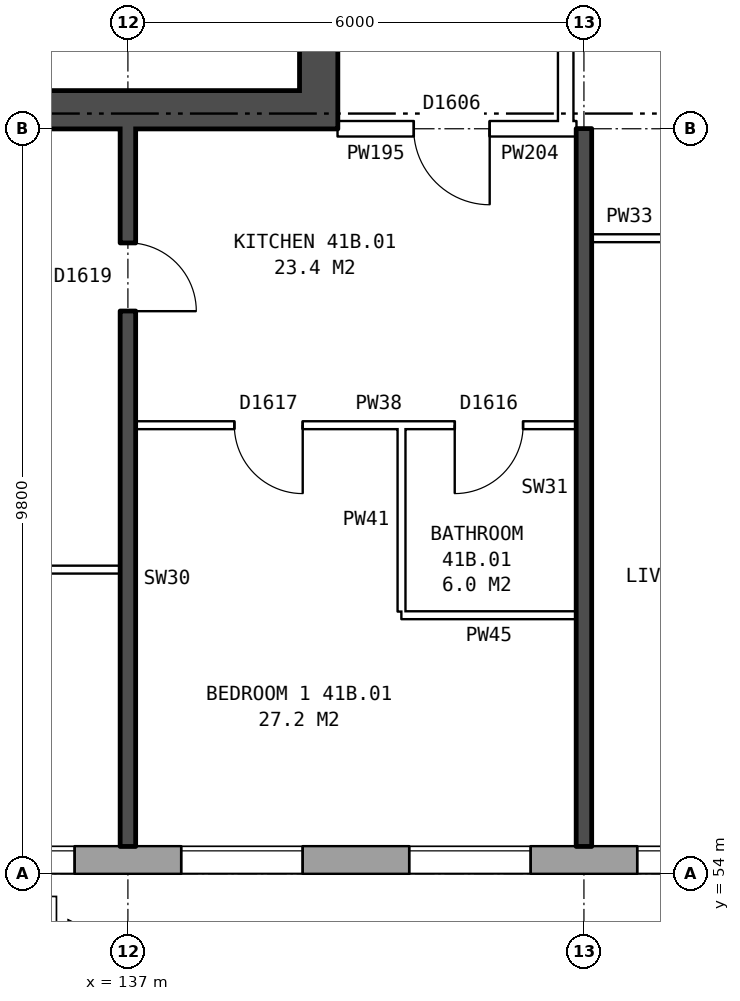
"""IFC4 building model, lengths in metres.
Left out: names, types, materials, properties, quantities, classifications, styles, units other than length and angle.
Written with IfcOpenShell. Run it as: python <this file> out.ifc"""

import sys

from ifc_helpers import new_model, si_unit, direction, frame, frame_2d, origin, place, context, subcontext, project, spatial, rectangle, extrude, element, fill, save


model = new_model("IFC4")
c1 = context("Model", 3, precision=1e-05, world=origin(), true_north=direction((0.0, 1.0)))
c2 = subcontext(c1, "Body", "Model", "MODEL_VIEW")
j1 = project(units=[si_unit("LENGTHUNIT", "METRE"), si_unit("PLANEANGLEUNIT", "RADIAN")], contexts=[c1])
p1 = place(None, origin())
s1 = spatial("IfcSite", under=j1, at=p1, CompositionType="ELEMENT")
p2 = place(p1, origin())
s2 = spatial("IfcBuilding", under=s1, at=p2, CompositionType="ELEMENT")
p3 = place(p2, frame((0.0, 0.0, 148.5)))
s3 = spatial("IfcBuildingStorey", under=s2, at=p3, CompositionType="ELEMENT", Elevation=148.5)
p4 = place(p3, frame((134.075, 54.18, 0.0), z_axis=(0.0, 0.0, 1.0), x_axis=(1.0, 0.0, 0.0)))
e1 = element("IfcWall", 1, at=p4, inside=s3, PredefinedType="STANDARD", context=c2, shape_type="SweptSolid", body=[
    extrude(rectangle(XDim=34.351, YDim=0.36, at=frame_2d((17.175, 0.0))), origin(), (0.0, 0.0, 1.0), 2.85),
])
p5 = place(p4, frame((0.625, 0.0, 0.8)))
e2 = element("IfcOpeningElement", 2, at=p5, cuts=e1, PredefinedType="OPENING", context=c2, shape_type="SweptSolid", body=[
    extrude(rectangle(XDim=1.6, YDim=1.8, at=frame_2d((0.8, 0.9))), frame((0.0, 0.19, 0.0), z_axis=(0.0, -1.0, 0.0), x_axis=(1.0, 0.0, 0.0)), (0.0, 0.0, 1.0), 0.38),
])
p6 = place(p4, frame((3.625, 0.0, 0.8)))
e3 = element("IfcOpeningElement", 3, at=p6, cuts=e1, PredefinedType="OPENING", context=c2, shape_type="SweptSolid", body=[
    extrude(rectangle(XDim=1.6, YDim=1.8, at=frame_2d((0.8, 0.9))), frame((0.0, 0.19, 0.0), z_axis=(0.0, -1.0, 0.0), x_axis=(1.0, 0.0, 0.0)), (0.0, 0.0, 1.0), 0.38),
])
p7 = place(p4, frame((6.625, 0.0, 0.8)))
e4 = element("IfcOpeningElement", 4, at=p7, cuts=e1, PredefinedType="OPENING", context=c2, shape_type="SweptSolid", body=[
    extrude(rectangle(XDim=1.6, YDim=1.8, at=frame_2d((0.8, 0.9))), frame((0.0, 0.19, 0.0), z_axis=(0.0, -1.0, 0.0), x_axis=(1.0, 0.0, 0.0)), (0.0, 0.0, 1.0), 0.38),
])
p8 = place(p4, frame((9.625, 0.0, 0.8)))
e5 = element("IfcOpeningElement", 5, at=p8, cuts=e1, PredefinedType="OPENING", context=c2, shape_type="SweptSolid", body=[
    extrude(rectangle(XDim=1.6, YDim=1.8, at=frame_2d((0.8, 0.9))), frame((0.0, 0.19, 0.0), z_axis=(0.0, -1.0, 0.0), x_axis=(1.0, 0.0, 0.0)), (0.0, 0.0, 1.0), 0.38),
])
p9 = place(p4, frame((12.625, 0.0, 0.8)))
e6 = element("IfcOpeningElement", 6, at=p9, cuts=e1, PredefinedType="OPENING", context=c2, shape_type="SweptSolid", body=[
    extrude(rectangle(XDim=1.6, YDim=1.8, at=frame_2d((0.8, 0.9))), frame((0.0, 0.19, 0.0), z_axis=(0.0, -1.0, 0.0), x_axis=(1.0, 0.0, 0.0)), (0.0, 0.0, 1.0), 0.38),
])
p10 = place(p4, frame((15.625, 0.0, 0.8)))
e7 = element("IfcOpeningElement", 7, at=p10, cuts=e1, PredefinedType="OPENING", context=c2, shape_type="SweptSolid", body=[
    extrude(rectangle(XDim=1.6, YDim=1.8, at=frame_2d((0.8, 0.9))), frame((0.0, 0.19, 0.0), z_axis=(0.0, -1.0, 0.0), x_axis=(1.0, 0.0, 0.0)), (0.0, 0.0, 1.0), 0.38),
])
p11 = place(p4, frame((18.625, 0.0, 0.8)))
e8 = element("IfcOpeningElement", 8, at=p11, cuts=e1, PredefinedType="OPENING", context=c2, shape_type="SweptSolid", body=[
    extrude(rectangle(XDim=1.6, YDim=1.8, at=frame_2d((0.8, 0.9))), frame((0.0, 0.19, 0.0), z_axis=(0.0, -1.0, 0.0), x_axis=(1.0, 0.0, 0.0)), (0.0, 0.0, 1.0), 0.38),
])
p12 = place(p4, frame((21.625, 0.0, 0.8)))
e9 = element("IfcOpeningElement", 9, at=p12, cuts=e1, PredefinedType="OPENING", context=c2, shape_type="SweptSolid", body=[
    extrude(rectangle(XDim=1.6, YDim=1.8, at=frame_2d((0.8, 0.9))), frame((0.0, 0.19, 0.0), z_axis=(0.0, -1.0, 0.0), x_axis=(1.0, 0.0, 0.0)), (0.0, 0.0, 1.0), 0.38),
])
p13 = place(p4, frame((24.625, 0.0, 0.8)))
e10 = element("IfcOpeningElement", 10, at=p13, cuts=e1, PredefinedType="OPENING", context=c2, shape_type="SweptSolid", body=[
    extrude(rectangle(XDim=1.6, YDim=1.8, at=frame_2d((0.8, 0.9))), frame((0.0, 0.19, 0.0), z_axis=(0.0, -1.0, 0.0), x_axis=(1.0, 0.0, 0.0)), (0.0, 0.0, 1.0), 0.38),
])
p14 = place(p4, frame((27.625, 0.0, 0.8)))
e11 = element("IfcOpeningElement", 11, at=p14, cuts=e1, PredefinedType="OPENING", context=c2, shape_type="SweptSolid", body=[
    extrude(rectangle(XDim=1.6, YDim=1.8, at=frame_2d((0.8, 0.9))), frame((0.0, 0.19, 0.0), z_axis=(0.0, -1.0, 0.0), x_axis=(1.0, 0.0, 0.0)), (0.0, 0.0, 1.0), 0.38),
])
p15 = place(p4, frame((30.625, 0.0, 0.8)))
e12 = element("IfcOpeningElement", 12, at=p15, cuts=e1, PredefinedType="OPENING", context=c2, shape_type="SweptSolid", body=[
    extrude(rectangle(XDim=1.6, YDim=1.8, at=frame_2d((0.8, 0.9))), frame((0.0, 0.19, 0.0), z_axis=(0.0, -1.0, 0.0), x_axis=(1.0, 0.0, 0.0)), (0.0, 0.0, 1.0), 0.38),
])
p16 = place(p3, frame((139.51, 63.8, 0.0), z_axis=(0.0, 0.0, 1.0), x_axis=(0.0, 1.0, 0.0)))
e13 = element("IfcWall", 13, at=p16, inside=s3, PredefinedType="SHEAR", context=c2, shape_type="SweptSolid", body=[
    extrude(rectangle(XDim=12.4, YDim=0.5, at=frame_2d((6.2, 0.0))), origin(), (0.0, 0.0, 1.0), 2.85),
])
p17 = place(p16, frame((1.325, 0.0, 0.0)))
e14 = element("IfcOpeningElement", 14, at=p17, cuts=e13, PredefinedType="OPENING", context=c2, shape_type="SweptSolid", body=[
    extrude(rectangle(XDim=1.1, YDim=2.1, at=frame_2d((0.55, 1.05))), frame((0.0, 0.26, 0.0), z_axis=(0.0, -1.0, 0.0), x_axis=(1.0, 0.0, 0.0)), (0.0, 0.0, 1.0), 0.52),
])
p18 = place(p16, frame((3.6, 0.0, 0.0)))
e15 = element("IfcOpeningElement", 15, at=p18, cuts=e13, PredefinedType="OPENING", context=c2, shape_type="SweptSolid", body=[
    extrude(rectangle(XDim=1.1, YDim=2.1, at=frame_2d((0.55, 1.05))), frame((0.0, 0.26, 0.0), z_axis=(0.0, -1.0, 0.0), x_axis=(1.0, 0.0, 0.0)), (0.0, 0.0, 1.0), 0.52),
])
p19 = place(p16, frame((5.8, 0.0, 0.0)))
e16 = element("IfcOpeningElement", 16, at=p19, cuts=e13, PredefinedType="OPENING", context=c2, shape_type="SweptSolid", body=[
    extrude(rectangle(XDim=1.1, YDim=2.1, at=frame_2d((0.55, 1.05))), frame((0.0, 0.26, 0.0), z_axis=(0.0, -1.0, 0.0), x_axis=(1.0, 0.0, 0.0)), (0.0, 0.0, 1.0), 0.52),
])
p20 = place(p16, frame((9.9, 0.0, 0.0)))
e17 = element("IfcOpeningElement", 17, at=p20, cuts=e13, PredefinedType="OPENING", context=c2, shape_type="SweptSolid", body=[
    extrude(rectangle(XDim=1.1, YDim=2.1, at=frame_2d((0.55, 1.05))), frame((0.0, 0.26, 0.0), z_axis=(0.0, -1.0, 0.0), x_axis=(1.0, 0.0, 0.0)), (0.0, 0.0, 1.0), 0.52),
])
p21 = place(p16, frame((8.125, 0.0, 0.0)))
e18 = element("IfcOpeningElement", 18, at=p21, cuts=e13, PredefinedType="OPENING", context=c2, shape_type="SweptSolid", body=[
    extrude(rectangle(XDim=0.85, YDim=2.1, at=frame_2d((0.425, 1.05))), frame((0.0, 0.26, 0.0), z_axis=(0.0, -1.0, 0.0), x_axis=(1.0, 0.0, 0.0)), (0.0, 0.0, 1.0), 0.52),
])
p22 = place(p3, frame((139.26, 64.05, 0.0), z_axis=(0.0, 0.0, 1.0), x_axis=(-1.0, 0.0, 0.0)))
e19 = element("IfcWall", 19, at=p22, inside=s3, PredefinedType="SHEAR", context=c2, shape_type="SweptSolid", body=[
    extrude(rectangle(XDim=7.4, YDim=0.5, at=frame_2d((3.7, 0.0))), origin(), (0.0, 0.0, 1.0), 2.85),
])
p23 = place(p3, frame((142.76, 63.9, 0.0), z_axis=(0.0, 0.0, 1.0), x_axis=(0.0, 1.0, 0.0)))
e20 = element("IfcWall", 20, at=p23, inside=s3, PredefinedType="PARTITIONING", context=c2, shape_type="SweptSolid", body=[
    extrude(rectangle(XDim=12.2, YDim=0.2, at=frame_2d((6.1, 0.0))), origin(), (0.0, 0.0, 1.0), 2.85),
])
p24 = place(p23, frame((5.1, 0.0, 0.0)))
e21 = element("IfcOpeningElement", 21, at=p24, cuts=e20, PredefinedType="OPENING", context=c2, shape_type="SweptSolid", body=[
    extrude(rectangle(XDim=2.0, YDim=2.1, at=frame_2d((1.0, 1.05))), frame((0.0, 0.11, 0.0), z_axis=(0.0, -1.0, 0.0), x_axis=(1.0, 0.0, 0.0)), (0.0, 0.0, 1.0), 0.22),
])
p25 = place(p3, frame((140.6, 57.4, 0.0), z_axis=(0.0, 0.0, 1.0), x_axis=(1.0, 0.0, 0.0)))
e22 = element("IfcWall", 22, at=p25, inside=s3, PredefinedType="PARTITIONING", context=c2, shape_type="SweptSolid", body=[
    extrude(rectangle(XDim=2.3, YDim=0.1, at=frame_2d((1.15, 0.0))), origin(), (0.0, 0.0, 1.0), 2.85),
])
p26 = place(p3, frame((131.36, 58.0, 0.0), z_axis=(0.0, 0.0, 1.0), x_axis=(1.0, 0.0, 0.0)))
e23 = element("IfcWall", 23, at=p26, inside=s3, PredefinedType="PARTITIONING", context=c2, shape_type="SweptSolid", body=[
    extrude(rectangle(XDim=5.54, YDim=0.1, at=frame_2d((2.77, 0.0))), origin(), (0.0, 0.0, 1.0), 2.85),
])
p27 = place(p26, frame((2.32, 0.0, 0.0)))
e24 = element("IfcOpeningElement", 24, at=p27, cuts=e23, PredefinedType="OPENING", context=c2, shape_type="SweptSolid", body=[
    extrude(rectangle(XDim=0.9, YDim=2.1, at=frame_2d((0.45, 1.05))), frame((0.0, 0.06, 0.0), z_axis=(0.0, -1.0, 0.0), x_axis=(1.0, 0.0, 0.0)), (0.0, 0.0, 1.0), 0.12),
])
p28 = place(p3, frame((137.1, 59.9, 0.0), z_axis=(0.0, 0.0, 1.0), x_axis=(1.0, 0.0, 0.0)))
e25 = element("IfcWall", 25, at=p28, inside=s3, PredefinedType="PARTITIONING", context=c2, shape_type="SweptSolid", body=[
    extrude(rectangle(XDim=5.8, YDim=0.1, at=frame_2d((2.9, 0.0))), origin(), (0.0, 0.0, 1.0), 2.85),
])
p29 = place(p28, frame((1.3, 0.0, 0.0)))
e26 = element("IfcOpeningElement", 26, at=p29, cuts=e25, PredefinedType="OPENING", context=c2, shape_type="SweptSolid", body=[
    extrude(rectangle(XDim=0.9, YDim=2.1, at=frame_2d((0.45, 1.05))), frame((0.0, 0.06, 0.0), z_axis=(0.0, -1.0, 0.0), x_axis=(1.0, 0.0, 0.0)), (0.0, 0.0, 1.0), 0.12),
])
p30 = place(p28, frame((4.2, 0.0, 0.0)))
e27 = element("IfcOpeningElement", 27, at=p30, cuts=e25, PredefinedType="OPENING", context=c2, shape_type="SweptSolid", body=[
    extrude(rectangle(XDim=0.9, YDim=2.1, at=frame_2d((0.45, 1.05))), frame((0.0, 0.06, 0.0), z_axis=(0.0, -1.0, 0.0), x_axis=(1.0, 0.0, 0.0)), (0.0, 0.0, 1.0), 0.12),
])
p31 = place(p3, frame((143.1, 62.36, 0.0), z_axis=(0.0, 0.0, 1.0), x_axis=(1.0, 0.0, 0.0)))
e28 = element("IfcWall", 28, at=p31, inside=s3, PredefinedType="PARTITIONING", context=c2, shape_type="SweptSolid", body=[
    extrude(rectangle(XDim=2.9, YDim=0.1, at=frame_2d((1.45, 0.0))), origin(), (0.0, 0.0, 1.0), 2.85),
])
p32 = place(p31, frame((1.0, 0.0, 0.0)))
e29 = element("IfcOpeningElement", 29, at=p32, cuts=e28, PredefinedType="OPENING", context=c2, shape_type="SweptSolid", body=[
    extrude(rectangle(XDim=0.9, YDim=2.1, at=frame_2d((0.45, 1.05))), frame((0.0, 0.06, 0.0), z_axis=(0.0, -1.0, 0.0), x_axis=(1.0, 0.0, 0.0)), (0.0, 0.0, 1.0), 0.12),
])
p33 = place(p3, frame((139.76, 63.8, 0.0), z_axis=(0.0, 0.0, 1.0), x_axis=(1.0, 0.0, 0.0)))
e30 = element("IfcWall", 30, at=p33, inside=s3, PredefinedType="PARTITIONING", context=c2, shape_type="SweptSolid", body=[
    extrude(rectangle(XDim=3.0, YDim=0.2, at=frame_2d((1.5, 0.0))), origin(), (0.0, 0.0, 1.0), 2.85),
])
p34 = place(p33, frame((1.0, 0.0, 0.0)))
e31 = element("IfcOpeningElement", 31, at=p34, cuts=e30, PredefinedType="OPENING", context=c2, shape_type="SweptSolid", body=[
    extrude(rectangle(XDim=1.0, YDim=2.1, at=frame_2d((0.5, 1.05))), frame((0.0, 0.11, 0.0), z_axis=(0.0, -1.0, 0.0), x_axis=(1.0, 0.0, 0.0)), (0.0, 0.0, 1.0), 0.22),
])
p35 = place(p3, frame((142.76, 63.8, 0.0), z_axis=(0.0, 0.0, 1.0), x_axis=(1.0, 0.0, 0.0)))
e32 = element("IfcWall", 32, at=p35, inside=s3, PredefinedType="PARTITIONING", context=c2, shape_type="SweptSolid", body=[
    extrude(rectangle(XDim=0.14, YDim=0.2, at=frame_2d((0.07, 0.0))), origin(), (0.0, 0.0, 1.0), 2.85),
])
p36 = place(p3, frame((137.0, 54.36, 0.0), z_axis=(0.0, 0.0, 1.0), x_axis=(0.0, 1.0, 0.0)))
e33 = element("IfcWall", 33, at=p36, inside=s3, PredefinedType="SOLIDWALL", context=c2, shape_type="SweptSolid", body=[
    extrude(rectangle(XDim=9.44, YDim=0.2, at=frame_2d((4.72, 0.0))), origin(), (0.0, 0.0, 1.0), 2.85),
])
p37 = place(p36, frame((7.04, 0.0, 0.0)))
e34 = element("IfcOpeningElement", 34, at=p37, cuts=e33, PredefinedType="OPENING", context=c2, shape_type="SweptSolid", body=[
    extrude(rectangle(XDim=0.9, YDim=2.1, at=frame_2d((0.45, 1.05))), frame((0.0, 0.11, 0.0), z_axis=(0.0, -1.0, 0.0), x_axis=(1.0, 0.0, 0.0)), (0.0, 0.0, 1.0), 0.22),
])
p38 = place(p3, frame((140.6, 57.45, 0.0), z_axis=(0.0, 0.0, 1.0), x_axis=(0.0, 1.0, 0.0)))
e35 = element("IfcWall", 35, at=p38, inside=s3, PredefinedType="PARTITIONING", context=c2, shape_type="SweptSolid", body=[
    extrude(rectangle(XDim=2.4, YDim=0.1, at=frame_2d((1.2, 0.0))), origin(), (0.0, 0.0, 1.0), 2.85),
])
p39 = place(p3, frame((143.0, 54.36, 0.0), z_axis=(0.0, 0.0, 1.0), x_axis=(0.0, 1.0, 0.0)))
e36 = element("IfcWall", 36, at=p39, inside=s3, PredefinedType="SOLIDWALL", context=c2, shape_type="SweptSolid", body=[
    extrude(rectangle(XDim=9.44, YDim=0.2, at=frame_2d((4.72, 0.0))), origin(), (0.0, 0.0, 1.0), 2.85),
])
p40 = place(p5, origin())
e37 = element("IfcWindow", 37, at=p40, inside=s3, PartitioningType="SINGLE_PANEL", PredefinedType="WINDOW", context=c2, shape_type="SweptSolid", body=[
    extrude(rectangle(XDim=1.6, YDim=1.8, at=frame_2d((0.8, 0.9))), frame((0.0, 0.15, 0.0), z_axis=(0.0, -1.0, 0.0), x_axis=(1.0, 0.0, 0.0)), (0.0, 0.0, 1.0), 0.06),
])
fill(e2, e37)
p41 = place(p6, origin())
e38 = element("IfcWindow", 38, at=p41, inside=s3, PartitioningType="SINGLE_PANEL", PredefinedType="WINDOW", context=c2, shape_type="SweptSolid", body=[
    extrude(rectangle(XDim=1.6, YDim=1.8, at=frame_2d((0.8, 0.9))), frame((0.0, 0.15, 0.0), z_axis=(0.0, -1.0, 0.0), x_axis=(1.0, 0.0, 0.0)), (0.0, 0.0, 1.0), 0.06),
])
fill(e3, e38)
p42 = place(p7, origin())
e39 = element("IfcWindow", 39, at=p42, inside=s3, PartitioningType="SINGLE_PANEL", PredefinedType="WINDOW", context=c2, shape_type="SweptSolid", body=[
    extrude(rectangle(XDim=1.6, YDim=1.8, at=frame_2d((0.8, 0.9))), frame((0.0, 0.15, 0.0), z_axis=(0.0, -1.0, 0.0), x_axis=(1.0, 0.0, 0.0)), (0.0, 0.0, 1.0), 0.06),
])
fill(e4, e39)
p43 = place(p8, origin())
e40 = element("IfcWindow", 40, at=p43, inside=s3, PartitioningType="SINGLE_PANEL", PredefinedType="WINDOW", context=c2, shape_type="SweptSolid", body=[
    extrude(rectangle(XDim=1.6, YDim=1.8, at=frame_2d((0.8, 0.9))), frame((0.0, 0.15, 0.0), z_axis=(0.0, -1.0, 0.0), x_axis=(1.0, 0.0, 0.0)), (0.0, 0.0, 1.0), 0.06),
])
fill(e5, e40)
p44 = place(p29, frame((0.9, 0.0, 0.0), z_axis=(0.0, 0.0, 1.0), x_axis=(-1.0, 0.0, 0.0)))
e41 = element("IfcDoor", 41, at=p44, inside=s3, OperationType="SINGLE_SWING_LEFT", PredefinedType="DOOR", context=c2, shape_type="SweptSolid", body=[
    extrude(rectangle(XDim=0.9, YDim=2.1, at=frame_2d((0.45, 1.05))), frame((0.0, 0.025, 0.0), z_axis=(0.0, -1.0, 0.0), x_axis=(1.0, 0.0, 0.0)), (0.0, 0.0, 1.0), 0.05),
])
fill(e26, e41)
p45 = place(p34, frame((1.0, 0.0, 0.0), z_axis=(0.0, 0.0, 1.0), x_axis=(-1.0, 0.0, 0.0)))
e42 = element("IfcDoor", 42, at=p45, inside=s3, OperationType="SINGLE_SWING_LEFT", PredefinedType="DOOR", context=c2, shape_type="SweptSolid", body=[
    extrude(rectangle(XDim=1.0, YDim=2.1, at=frame_2d((0.5, 1.05))), frame((0.0, 0.025, 0.0), z_axis=(0.0, -1.0, 0.0), x_axis=(1.0, 0.0, 0.0)), (0.0, 0.0, 1.0), 0.05),
])
fill(e31, e42)
p46 = place(p37, frame((0.9, 0.0, 0.0), z_axis=(0.0, 0.0, 1.0), x_axis=(-1.0, 0.0, 0.0)))
e43 = element("IfcDoor", 43, at=p46, inside=s3, OperationType="SINGLE_SWING_RIGHT", PredefinedType="DOOR", context=c2, shape_type="SweptSolid", body=[
    extrude(rectangle(XDim=0.9, YDim=2.1, at=frame_2d((0.45, 1.05))), frame((0.0, 0.025, 0.0), z_axis=(0.0, -1.0, 0.0), x_axis=(1.0, 0.0, 0.0)), (0.0, 0.0, 1.0), 0.05),
])
fill(e34, e43)
p47 = place(p30, frame((0.9, 0.0, 0.0), z_axis=(0.0, 0.0, 1.0), x_axis=(-1.0, 0.0, 0.0)))
e44 = element("IfcDoor", 44, at=p47, inside=s3, OperationType="SINGLE_SWING_RIGHT", PredefinedType="DOOR", context=c2, shape_type="SweptSolid", body=[
    extrude(rectangle(XDim=0.9, YDim=2.1, at=frame_2d((0.45, 1.05))), frame((0.0, 0.025, 0.0), z_axis=(0.0, -1.0, 0.0), x_axis=(1.0, 0.0, 0.0)), (0.0, 0.0, 1.0), 0.05),
])
fill(e27, e44)
save(model, sys.argv[1])
